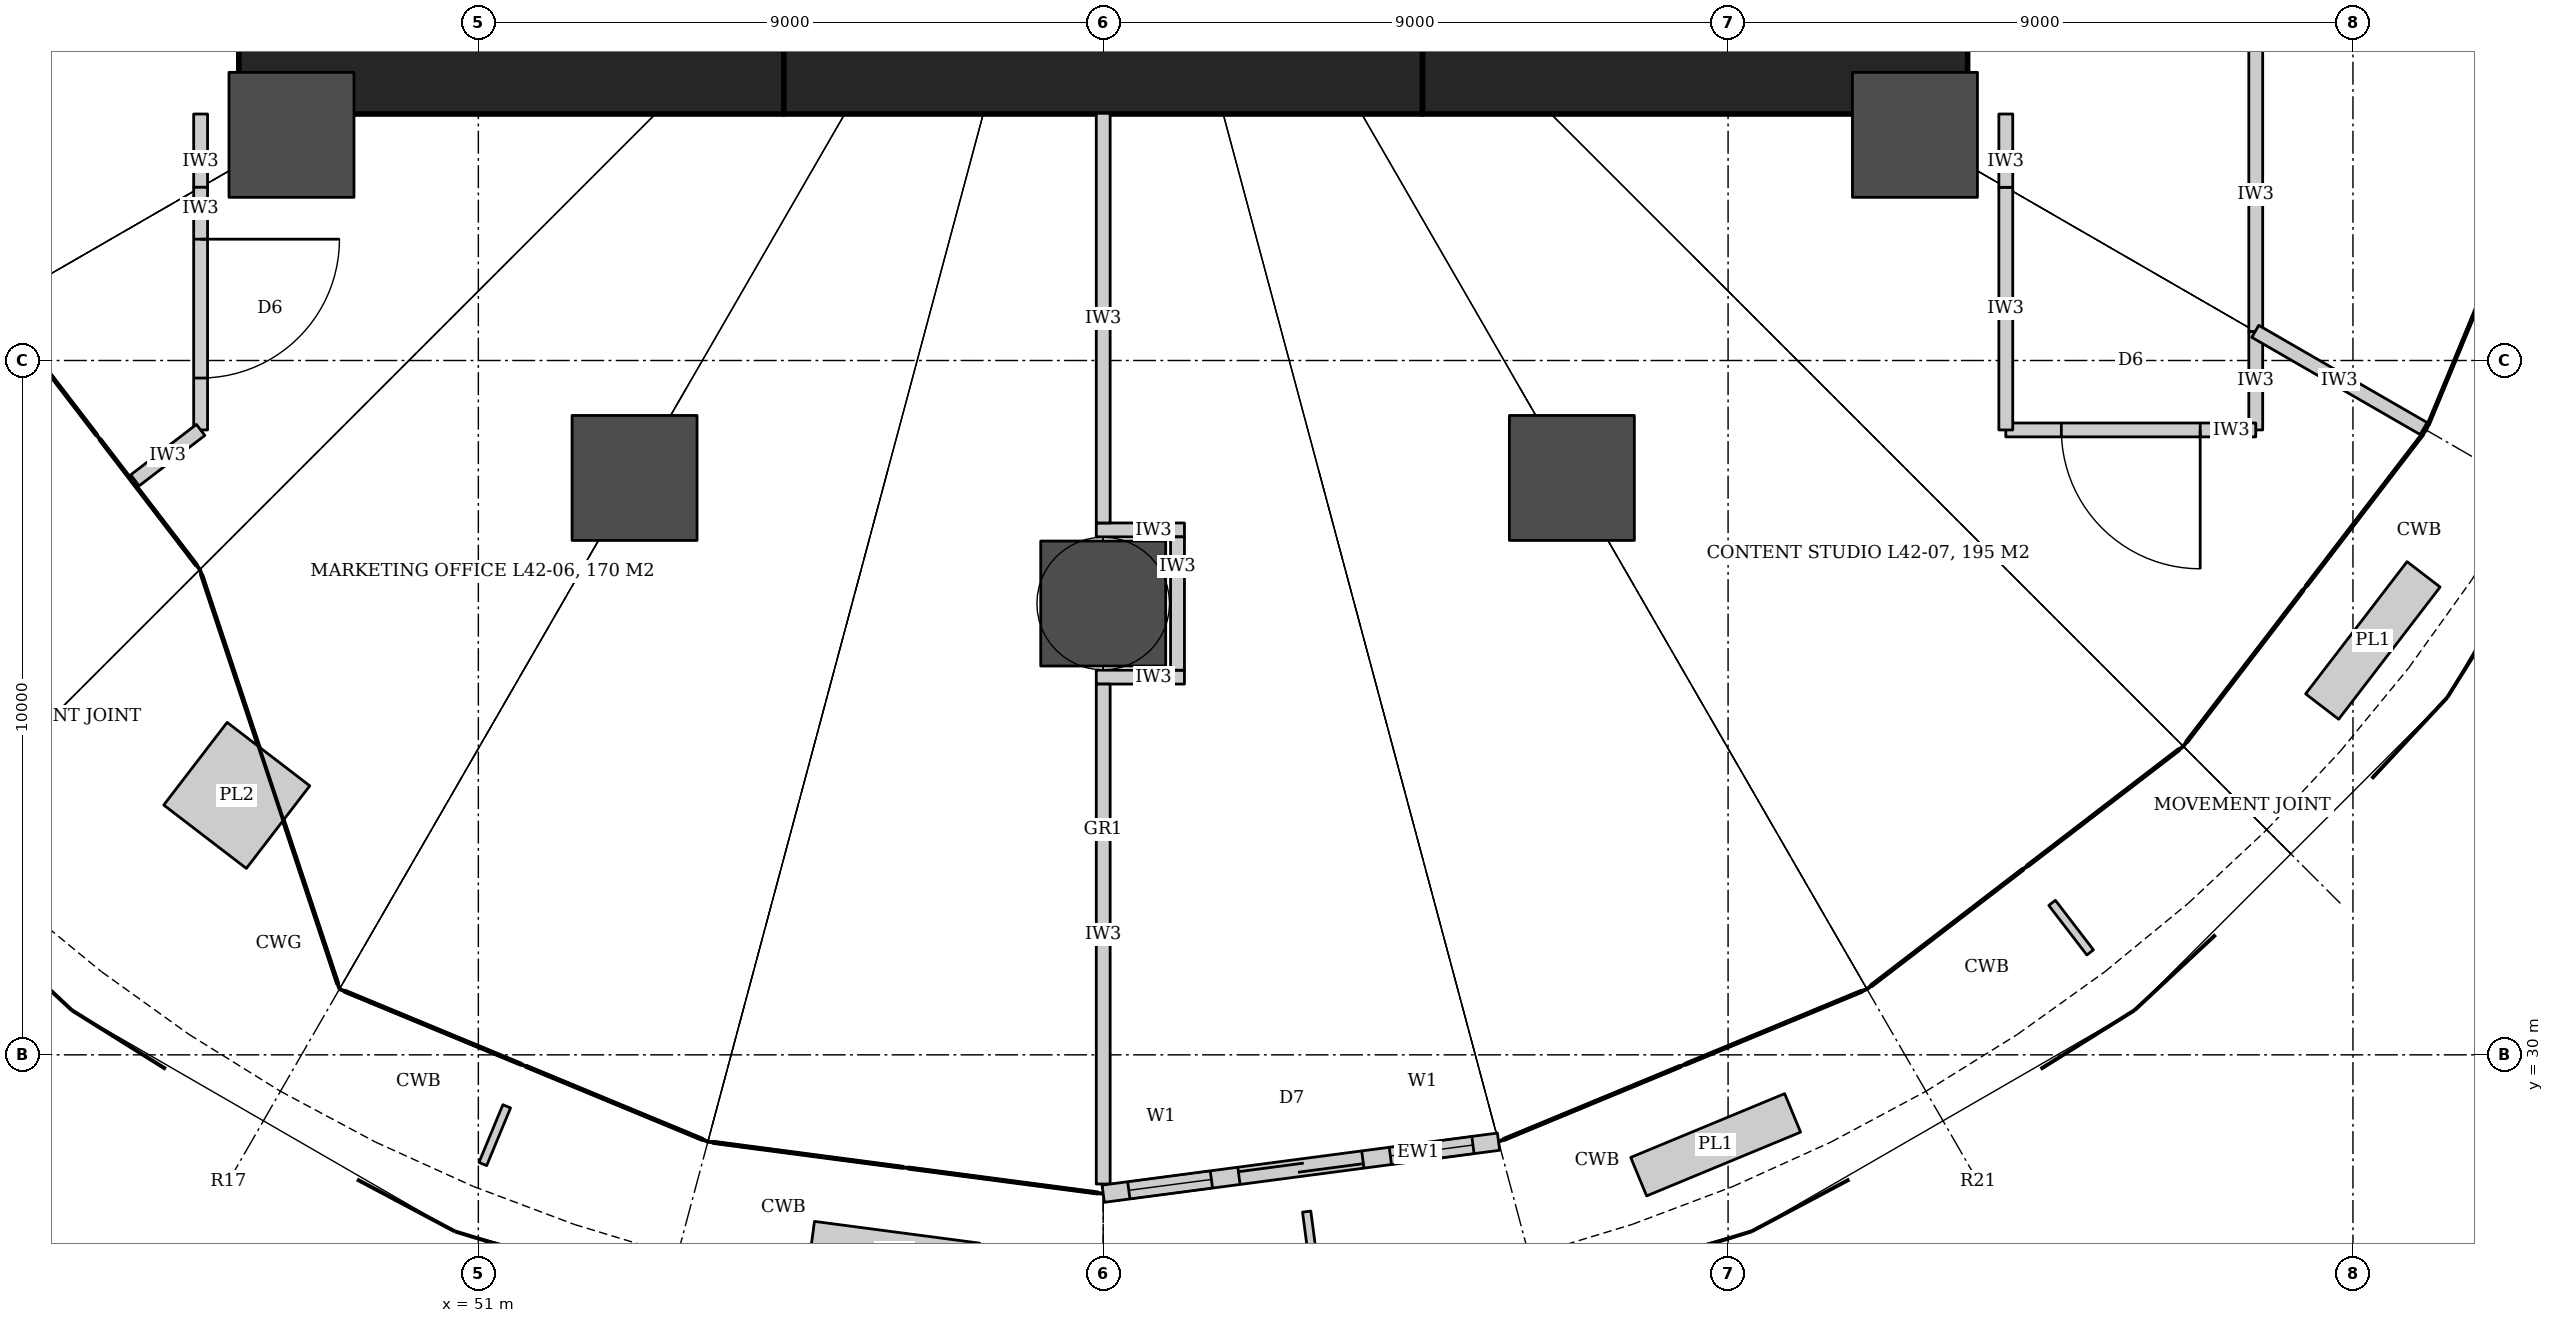
"""IFC4 building model, lengths in metres.
Left out: names, types, materials, properties, quantities, classifications, styles, units other than length and angle.
Written with IfcOpenShell. Run it as: python <this file> out.ifc"""

import sys

from ifc_helpers import new_model, si_unit, direction, frame, frame_2d, origin, origin_2d, place, context, subcontext, project, spatial, rectangle, hollow_circle, extrude, element, fill, save


model = new_model("IFC4")
c1 = context("Model", 3, precision=1e-05, world=origin(), true_north=direction((0.0, 1.0)))
c2 = subcontext(c1, "Body", "Model", "MODEL_VIEW")
j1 = project(units=[si_unit("LENGTHUNIT", "METRE"), si_unit("PLANEANGLEUNIT", "RADIAN")], contexts=[c1])
p1 = place(None, origin())
s1 = spatial("IfcSite", under=j1, at=p1, CompositionType="ELEMENT")
p2 = place(p1, origin())
s2 = spatial("IfcBuilding", under=s1, at=p2, CompositionType="ELEMENT")
p3 = place(p2, frame((0.0, 0.0, 185.6)))
s3 = spatial("IfcBuildingStorey", under=s2, at=p3, CompositionType="ELEMENT", Elevation=185.6)
p4 = place(p3, frame((47.55, 44.45, 0.0), z_axis=(0.0, 0.0, 1.0), x_axis=(1.0, 0.0, 0.0)))
e1 = element("IfcWall", 1, at=p4, inside=s3, PredefinedType="SHEAR", context=c2, shape_type="SweptSolid", body=[
    extrude(rectangle(XDim=7.85, YDim=1.8, at=frame_2d((3.925, 0.0))), origin(), (0.0, 0.0, 1.0), 4.2),
])
p5 = place(p3, frame((55.4, 44.45, 0.0), z_axis=(0.0, 0.0, 1.0), x_axis=(1.0, 0.0, 0.0)))
e2 = element("IfcWall", 2, at=p5, inside=s3, PredefinedType="SHEAR", context=c2, shape_type="SweptSolid", body=[
    extrude(rectangle(XDim=9.2, YDim=1.8, at=frame_2d((4.6, 0.0))), origin(), (0.0, 0.0, 1.0), 4.2),
])
p6 = place(p3, frame((64.6, 44.45, 0.0), z_axis=(0.0, 0.0, 1.0), x_axis=(1.0, 0.0, 0.0)))
e3 = element("IfcWall", 3, at=p6, inside=s3, PredefinedType="SHEAR", context=c2, shape_type="SweptSolid", body=[
    extrude(rectangle(XDim=7.85, YDim=1.8, at=frame_2d((3.925, 0.0))), origin(), (0.0, 0.0, 1.0), 4.2),
])
for number, where, z_axis, x_axis in (
    (4, (48.309, 43.25, 0.0), (0.0, 0.0, 1.0), (1.0, 0.0, 0.0)),
    (5, (53.25, 38.309, 0.0), (0.0, 0.0, 1.0), (1.0, 0.0, 0.0)),
    (6, (60.0, 36.5, 0.0), (0.0, 0.0, 1.0), (1.0, 0.0, 0.0)),
    (7, (66.75, 38.309, 0.0), (0.0, 0.0, 1.0), (1.0, 0.0, 0.0)),
    (8, (71.691, 43.25, 0.0), (0.0, 0.0, 1.0), (1.0, 0.0, 0.0)),
):
    element("IfcColumn", number, at=place(p3, frame(where, z_axis=z_axis, x_axis=x_axis)), inside=s3, PredefinedType="COLUMN", context=c2, shape_type="SweptSolid", body=[
        extrude(hollow_circle(Radius=0.9, WallThickness=0.09, at=origin_2d()), origin(), (0.0, 0.0, 1.0), 4.2),
    ])
p7 = place(p3, frame((76.6, 50.0, 0.0), z_axis=(0.0, 0.0, 1.0), x_axis=(0.0, -1.0, 0.0)))
e9 = element("IfcWall", 9, at=p7, inside=s3, PredefinedType="PARTITIONING", context=c2, shape_type="SweptSolid", body=[
    extrude(rectangle(XDim=9.584, YDim=0.2, at=frame_2d((4.792, 0.0))), origin(), (0.0, 0.0, 1.0), 3.012),
])
p8 = place(p7, frame((4.292, 0.0, 0.0)))
e10 = element("IfcOpeningElement", 10, at=p8, cuts=e9, PredefinedType="OPENING", context=c2, shape_type="SweptSolid", body=[
    extrude(rectangle(XDim=1.0, YDim=2.1, at=frame_2d((0.5, 1.05))), frame((0.0, 0.11, 0.0), z_axis=(0.0, -1.0, 0.0), x_axis=(1.0, 0.0, 0.0)), (0.0, 0.0, 1.0), 0.22),
])
p9 = place(p3, frame((76.6, 40.416, 0.0), z_axis=(0.0, 0.0, 1.0), x_axis=(0.0, -1.0, 0.0)))
e11 = element("IfcWall", 11, at=p9, inside=s3, PredefinedType="PARTITIONING", context=c2, shape_type="SweptSolid", body=[
    extrude(rectangle(XDim=1.416, YDim=0.2, at=frame_2d((0.708, 0.0))), origin(), (0.0, 0.0, 1.0), 3.012),
])
p10 = place(p3, frame((76.6, 39.0, 0.0), z_axis=(0.0, 0.0, 1.0), x_axis=(-1.0, 0.0, 0.0)))
e12 = element("IfcWall", 12, at=p10, inside=s3, PredefinedType="PARTITIONING", context=c2, shape_type="SweptSolid", body=[
    extrude(rectangle(XDim=3.6, YDim=0.2, at=frame_2d((1.8, 0.0))), origin(), (0.0, 0.0, 1.0), 3.04),
])
p11 = place(p10, frame((0.8, 0.0, 0.0)))
e13 = element("IfcOpeningElement", 13, at=p11, cuts=e12, PredefinedType="OPENING", context=c2, shape_type="SweptSolid", body=[
    extrude(rectangle(XDim=2.0, YDim=2.1, at=frame_2d((1.0, 1.05))), frame((0.0, 0.11, 0.0), z_axis=(0.0, -1.0, 0.0), x_axis=(1.0, 0.0, 0.0)), (0.0, 0.0, 1.0), 0.22),
])
p12 = place(p3, frame((73.0, 39.0, 0.0), z_axis=(0.0, 0.0, 1.0), x_axis=(0.0, 1.0, 0.0)))
e14 = element("IfcWall", 14, at=p12, inside=s3, PredefinedType="PARTITIONING", context=c2, shape_type="SweptSolid", body=[
    extrude(rectangle(XDim=3.494, YDim=0.2, at=frame_2d((1.747, 0.0))), origin(), (0.0, 0.0, 1.0), 3.012),
])
for number, where, z_axis, x_axis in (
    (15, (73.0, 42.494, 0.0), (0.0, 0.0, 1.0), (0.0, 1.0, 0.0)),
    (16, (47.0, 43.55, 0.0), (0.0, 0.0, 1.0), (0.0, -1.0, 0.0)),
):
    element("IfcWall", number, at=place(p3, frame(where, z_axis=z_axis, x_axis=x_axis)), inside=s3, PredefinedType="PARTITIONING", context=c2, shape_type="SweptSolid", body=[
        extrude(rectangle(XDim=1.056, YDim=0.2, at=frame_2d((0.528, 0.0))), origin(), (0.0, 0.0, 1.0), 3.012),
    ])
p13 = place(p3, frame((47.0, 42.494, 0.0), z_axis=(0.0, 0.0, 1.0), x_axis=(0.0, -1.0, 0.0)))
e17 = element("IfcWall", 17, at=p13, inside=s3, PredefinedType="PARTITIONING", context=c2, shape_type="SweptSolid", body=[
    extrude(rectangle(XDim=3.494, YDim=0.2, at=frame_2d((1.747, 0.0))), origin(), (0.0, 0.0, 1.0), 3.012),
])
p14 = place(p13, frame((0.747, 0.0, 0.0)))
e18 = element("IfcOpeningElement", 18, at=p14, cuts=e17, PredefinedType="OPENING", context=c2, shape_type="SweptSolid", body=[
    extrude(rectangle(XDim=2.0, YDim=2.1, at=frame_2d((1.0, 1.05))), frame((0.0, 0.11, 0.0), z_axis=(0.0, -1.0, 0.0), x_axis=(1.0, 0.0, 0.0)), (0.0, 0.0, 1.0), 0.22),
])
for number, where, z_axis, x_axis in (
    (19, (59.9, 37.56, 0.0), (0.0, 0.0, 1.0), (1.0, 0.0, 0.0)),
    (20, (59.9, 35.44, 0.0), (0.0, 0.0, 1.0), (1.0, 0.0, 0.0)),
):
    element("IfcWall", number, at=place(p3, frame(where, z_axis=z_axis, x_axis=x_axis)), inside=s3, PredefinedType="PARTITIONING", context=c2, shape_type="SweptSolid", body=[
        extrude(rectangle(XDim=1.27, YDim=0.2, at=frame_2d((0.635, 0.0))), origin(), (0.0, 0.0, 1.0), 3.012),
    ])
p15 = place(p3, frame((61.07, 37.46, 0.0), z_axis=(0.0, 0.0, 1.0), x_axis=(0.0, -1.0, 0.0)))
e21 = element("IfcWall", 21, at=p15, inside=s3, PredefinedType="PARTITIONING", context=c2, shape_type="SweptSolid", body=[
    extrude(rectangle(XDim=1.92, YDim=0.2, at=frame_2d((0.96, 0.0))), origin(), (0.0, 0.0, 1.0), 3.012),
])
p16 = place(p3, frame((60.0, 43.56, 0.0), z_axis=(0.0, 0.0, 1.0), x_axis=(0.0, -1.0, 0.0)))
e22 = element("IfcWall", 22, at=p16, inside=s3, PredefinedType="PARTITIONING", context=c2, shape_type="SweptSolid", body=[
    extrude(rectangle(XDim=5.9, YDim=0.2, at=frame_2d((2.95, 0.0))), origin(), (0.0, 0.0, 1.0), 3.04),
])
p17 = place(p3, frame((60.0, 35.34, 0.0), z_axis=(0.0, 0.0, 1.0), x_axis=(0.0, -1.0, 0.0)))
e23 = element("IfcWall", 23, at=p17, inside=s3, PredefinedType="PARTITIONING", context=c2, shape_type="SweptSolid", body=[
    extrude(rectangle(XDim=7.2, YDim=0.2, at=frame_2d((3.6, 0.0))), origin(), (0.0, 0.0, 1.0), 3.012),
])
p18 = place(p3, frame((76.593, 40.42, 0.0), z_axis=(0.0, 0.0, 1.0), x_axis=(0.866034573852, -0.49998411664, 0.0)))
e24 = element("IfcWall", 24, at=p18, inside=s3, PredefinedType="PARTITIONING", context=c2, shape_type="SweptSolid", body=[
    extrude(rectangle(XDim=2.8, YDim=0.2, at=frame_2d((1.4, 0.0))), origin(), (0.0, 0.0, 1.0), 3.012),
])
p19 = place(p3, frame((47.0, 39.0, 0.0), z_axis=(0.0, 0.0, 1.0), x_axis=(-0.793369098288, -0.608740892237, 0.0)))
e25 = element("IfcWall", 25, at=p19, inside=s3, PredefinedType="PARTITIONING", context=c2, shape_type="SweptSolid", body=[
    extrude(rectangle(XDim=1.193, YDim=0.2, at=frame_2d((0.596, 0.0))), origin(), (0.0, 0.0, 1.0), 3.04),
])
p20 = place(p3, frame((60.0, 28.0, 0.0), z_axis=(0.0, 0.0, 1.0), x_axis=(0.991447783331, 0.130503995834, 0.0)))
e26 = element("IfcWall", 26, at=p20, inside=s3, PredefinedType="SOLIDWALL", context=c2, shape_type="SweptSolid", body=[
    extrude(rectangle(XDim=5.743, YDim=0.25, at=frame_2d((2.872, 0.0))), origin(), (0.0, 0.0, 1.0), 4.04),
])
p21 = place(p20, frame((1.972, 0.0, 0.0)))
e27 = element("IfcOpeningElement", 27, at=p21, cuts=e26, PredefinedType="OPENING", context=c2, shape_type="SweptSolid", body=[
    extrude(rectangle(XDim=1.8, YDim=2.4, at=frame_2d((0.9, 1.2))), frame((0.0, 0.135, 0.0), z_axis=(0.0, -1.0, 0.0), x_axis=(1.0, 0.0, 0.0)), (0.0, 0.0, 1.0), 0.27),
])
p22 = place(p20, frame((0.372, 0.0, 0.0)))
e28 = element("IfcOpeningElement", 28, at=p22, cuts=e26, PredefinedType="OPENING", context=c2, shape_type="SweptSolid", body=[
    extrude(rectangle(XDim=1.2, YDim=2.4, at=frame_2d((0.6, 1.2))), frame((0.0, 0.135, 0.0), z_axis=(0.0, -1.0, 0.0), x_axis=(1.0, 0.0, 0.0)), (0.0, 0.0, 1.0), 0.27),
])
p23 = place(p20, frame((4.172, 0.0, 0.0)))
e29 = element("IfcOpeningElement", 29, at=p23, cuts=e26, PredefinedType="OPENING", context=c2, shape_type="SweptSolid", body=[
    extrude(rectangle(XDim=1.2, YDim=2.4, at=frame_2d((0.6, 1.2))), frame((0.0, 0.135, 0.0), z_axis=(0.0, -1.0, 0.0), x_axis=(1.0, 0.0, 0.0)), (0.0, 0.0, 1.0), 0.27),
])
p24 = place(p14, origin())
e30 = element("IfcDoor", 30, at=p24, inside=s3, OperationType="DOUBLE_DOOR_DOUBLE_SWING", PredefinedType="DOOR", context=c2, shape_type="SweptSolid", body=[
    extrude(rectangle(XDim=2.0, YDim=2.1, at=frame_2d((1.0, 1.05))), frame((0.0, 0.025, 0.0), z_axis=(0.0, -1.0, 0.0), x_axis=(1.0, 0.0, 0.0)), (0.0, 0.0, 1.0), 0.05),
])
fill(e18, e30)
p25 = place(p11, origin())
e31 = element("IfcDoor", 31, at=p25, inside=s3, OperationType="DOUBLE_DOOR_DOUBLE_SWING", PredefinedType="DOOR", context=c2, shape_type="SweptSolid", body=[
    extrude(rectangle(XDim=2.0, YDim=2.1, at=frame_2d((1.0, 1.05))), frame((0.0, 0.025, 0.0), z_axis=(0.0, -1.0, 0.0), x_axis=(1.0, 0.0, 0.0)), (0.0, 0.0, 1.0), 0.05),
])
fill(e13, e31)
p26 = place(p21, origin())
e32 = element("IfcDoor", 32, at=p26, inside=s3, OperationType="DOUBLE_DOOR_SLIDING", PredefinedType="DOOR", context=c2, shape_type="SweptSolid", body=[
    extrude(rectangle(XDim=1.8, YDim=2.4, at=frame_2d((0.9, 1.2))), frame((0.0, 0.025, 0.0), z_axis=(0.0, -1.0, 0.0), x_axis=(1.0, 0.0, 0.0)), (0.0, 0.0, 1.0), 0.05),
])
fill(e27, e32)
p27 = place(p22, origin())
e33 = element("IfcWindow", 33, at=p27, inside=s3, PartitioningType="SINGLE_PANEL", PredefinedType="WINDOW", context=c2, shape_type="SweptSolid", body=[
    extrude(rectangle(XDim=1.2, YDim=2.4, at=frame_2d((0.6, 1.2))), frame((0.0, 0.03, 0.0), z_axis=(0.0, -1.0, 0.0), x_axis=(1.0, 0.0, 0.0)), (0.0, 0.0, 1.0), 0.06),
])
fill(e28, e33)
p28 = place(p23, origin())
e34 = element("IfcWindow", 34, at=p28, inside=s3, PartitioningType="SINGLE_PANEL", PredefinedType="WINDOW", context=c2, shape_type="SweptSolid", body=[
    extrude(rectangle(XDim=1.2, YDim=2.4, at=frame_2d((0.6, 1.2))), frame((0.0, 0.03, 0.0), z_axis=(0.0, -1.0, 0.0), x_axis=(1.0, 0.0, 0.0)), (0.0, 0.0, 1.0), 0.06),
])
fill(e29, e34)
save(model, sys.argv[1])
